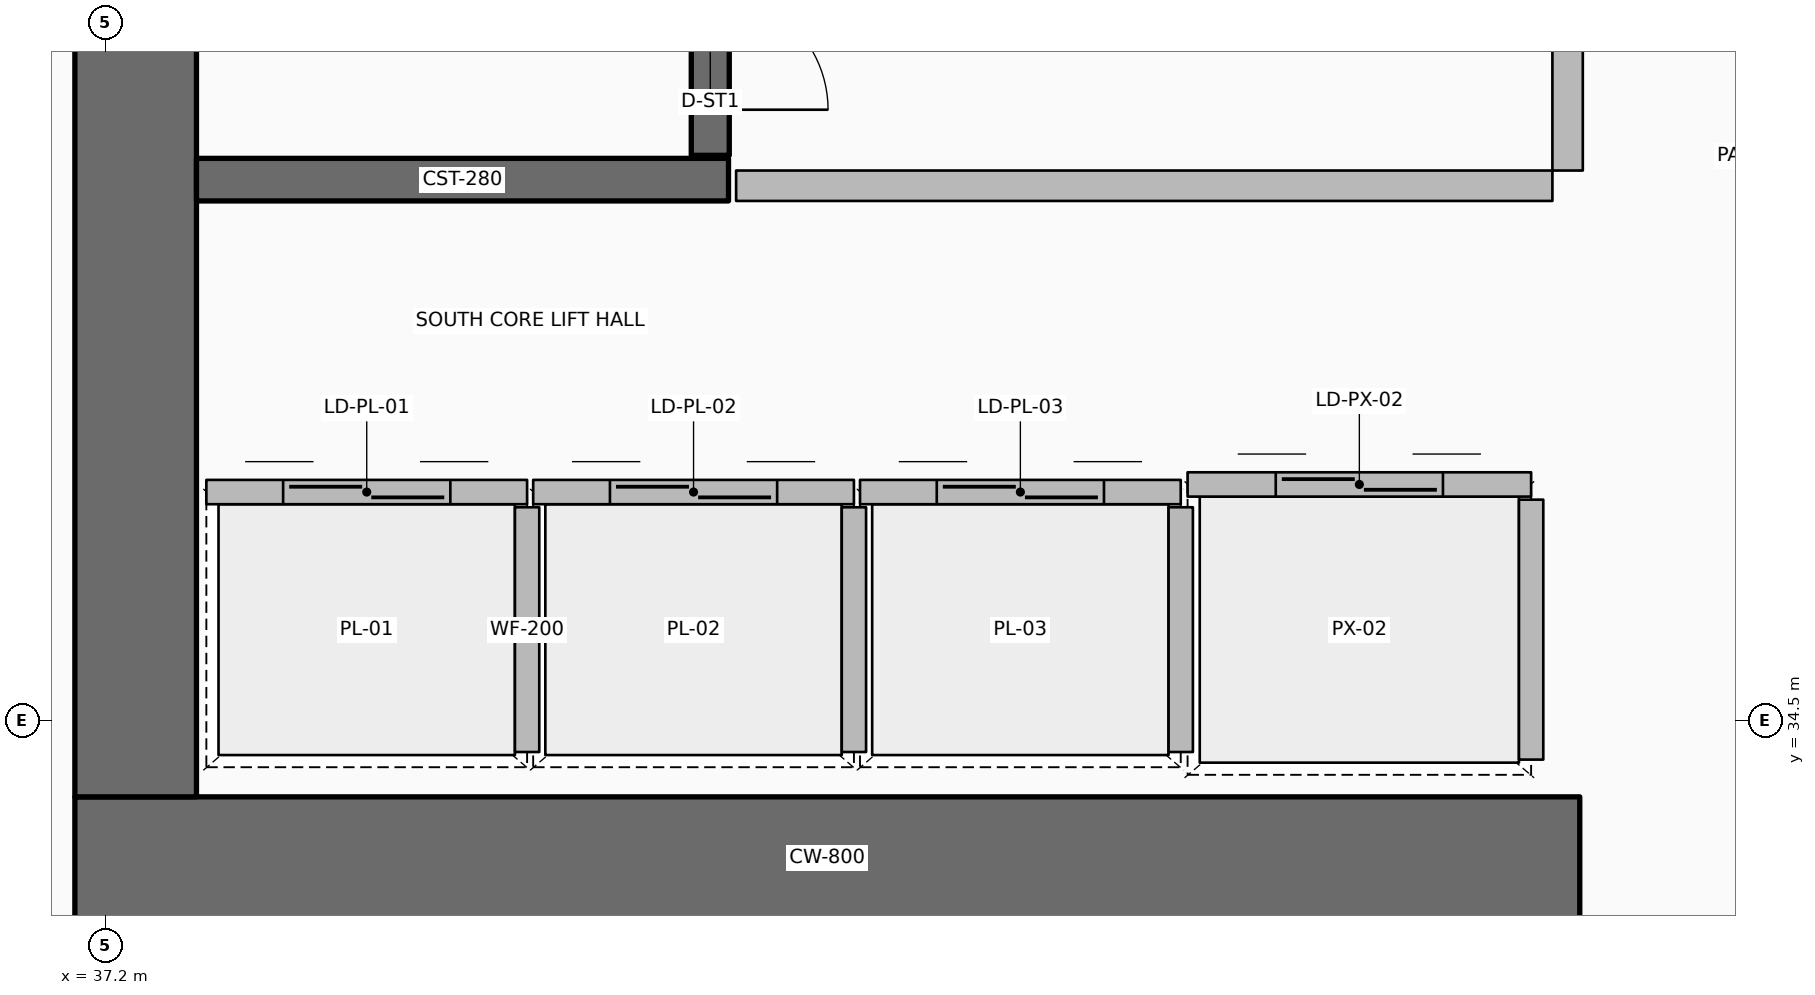
"""IFC4 building model, lengths in metres.
Left out: names, types, materials, properties, quantities, classifications, styles, units other than length and angle.
Written with IfcOpenShell. Run it as: python <this file> out.ifc"""

import sys

from ifc_helpers import new_model, si_unit, direction, frame, frame_2d, origin, place, context, subcontext, project, spatial, rectangle, extrude, element, fill, save


model = new_model("IFC4")
c1 = context("Model", 3, precision=1e-05, world=origin(), true_north=direction((0.0, 1.0)))
c2 = subcontext(c1, "Body", "Model", "MODEL_VIEW")
j1 = project(units=[si_unit("LENGTHUNIT", "METRE"), si_unit("PLANEANGLEUNIT", "RADIAN")], contexts=[c1])
p1 = place(None, origin())
s1 = spatial("IfcSite", under=j1, at=p1, CompositionType="ELEMENT")
p2 = place(p1, origin())
s2 = spatial("IfcBuilding", under=s1, at=p2, CompositionType="ELEMENT")
p3 = place(p2, frame((0.0, 0.0, 123.0)))
s3 = spatial("IfcBuildingStorey", under=s2, at=p3, CompositionType="ELEMENT", Elevation=123.0)
p4 = place(p3, frame((37.0, 33.6, 0.0), z_axis=(0.0, 0.0, 1.0), x_axis=(1.0, 0.0, 0.0)))
e1 = element("IfcWall", 1, at=p4, inside=s3, PredefinedType="SHEAR", context=c2, shape_type="SweptSolid", body=[
    extrude(rectangle(XDim=9.9, YDim=0.8, at=frame_2d((4.95, 0.0))), origin(), (0.0, 0.0, 1.0), 4.8),
])
p5 = place(p3, frame((37.4, 34.0, 0.0), z_axis=(0.0, 0.0, 1.0), x_axis=(0.0, 1.0, 0.0)))
e2 = element("IfcWall", 2, at=p5, inside=s3, PredefinedType="SHEAR", context=c2, shape_type="SweptSolid", body=[
    extrude(rectangle(XDim=16.0, YDim=0.8, at=frame_2d((8.0, 0.0))), origin(), (0.0, 0.0, 1.0), 4.8),
])
p6 = place(p3, frame((37.8, 38.06, 0.0), z_axis=(0.0, 0.0, 1.0), x_axis=(1.0, 0.0, 0.0)))
e3 = element("IfcWall", 3, at=p6, inside=s3, PredefinedType="SHEAR", context=c2, shape_type="SweptSolid", body=[
    extrude(rectangle(XDim=3.5, YDim=0.28, at=frame_2d((1.75, 0.0))), origin(), (0.0, 0.0, 1.0), 4.8),
])
p7 = place(p3, frame((41.18, 38.22, 0.0), z_axis=(0.0, 0.0, 1.0), x_axis=(0.0, 1.0, 0.0)))
e4 = element("IfcWall", 4, at=p7, inside=s3, PredefinedType="SOLIDWALL", context=c2, shape_type="SweptSolid", body=[
    extrude(rectangle(XDim=7.56, YDim=0.25, at=frame_2d((3.78, 0.0))), origin(), (0.0, 0.0, 1.0), 4.4),
])
p8 = place(p7, frame((0.3, 0.0, 0.0)))
e5 = element("IfcOpeningElement", 5, at=p8, cuts=e4, PredefinedType="OPENING", context=c2, shape_type="SweptSolid", body=[
    extrude(rectangle(XDim=1.55, YDim=2.15, at=frame_2d((0.775, 1.075))), frame((0.0, 0.135, 0.0), z_axis=(0.0, -1.0, 0.0), x_axis=(1.0, 0.0, 0.0)), (0.0, 0.0, 1.0), 0.27),
])
p9 = place(p3, frame((37.865, 36.005, 0.0), z_axis=(0.0, 0.0, 1.0), x_axis=(1.0, 0.0, 0.0)))
e6 = element("IfcWall", 6, at=p9, inside=s3, PredefinedType="PARTITIONING", context=c2, shape_type="SweptSolid", body=[
    extrude(rectangle(XDim=2.11, YDim=0.16, at=frame_2d((1.055, 0.0))), origin(), (0.0, 0.0, 1.0), 4.4),
])
p10 = place(p9, frame((0.505, 0.0, 0.0)))
e7 = element("IfcOpeningElement", 7, at=p10, cuts=e6, PredefinedType="OPENING", context=c2, shape_type="SweptSolid", body=[
    extrude(rectangle(XDim=1.1, YDim=2.1, at=frame_2d((0.55, 1.05))), frame((0.0, 0.09, 0.0), z_axis=(0.0, -1.0, 0.0), x_axis=(1.0, 0.0, 0.0)), (0.0, 0.0, 1.0), 0.18),
])
p11 = place(p3, frame((39.975, 34.295, 0.0), z_axis=(0.0, 0.0, 1.0), x_axis=(0.0, 1.0, 0.0)))
e8 = element("IfcWall", 8, at=p11, inside=s3, PredefinedType="PARTITIONING", context=c2, shape_type="SweptSolid", body=[
    extrude(rectangle(XDim=1.61, YDim=0.16, at=frame_2d((0.805, 0.0))), origin(), (0.0, 0.0, 1.0), 4.4),
])
p12 = place(p3, frame((40.015, 36.005, 0.0), z_axis=(0.0, 0.0, 1.0), x_axis=(1.0, 0.0, 0.0)))
e9 = element("IfcWall", 9, at=p12, inside=s3, PredefinedType="PARTITIONING", context=c2, shape_type="SweptSolid", body=[
    extrude(rectangle(XDim=2.11, YDim=0.16, at=frame_2d((1.055, 0.0))), origin(), (0.0, 0.0, 1.0), 4.4),
])
p13 = place(p12, frame((0.505, 0.0, 0.0)))
e10 = element("IfcOpeningElement", 10, at=p13, cuts=e9, PredefinedType="OPENING", context=c2, shape_type="SweptSolid", body=[
    extrude(rectangle(XDim=1.1, YDim=2.1, at=frame_2d((0.55, 1.05))), frame((0.0, 0.09, 0.0), z_axis=(0.0, -1.0, 0.0), x_axis=(1.0, 0.0, 0.0)), (0.0, 0.0, 1.0), 0.18),
])
p14 = place(p3, frame((42.125, 34.295, 0.0), z_axis=(0.0, 0.0, 1.0), x_axis=(0.0, 1.0, 0.0)))
e11 = element("IfcWall", 11, at=p14, inside=s3, PredefinedType="PARTITIONING", context=c2, shape_type="SweptSolid", body=[
    extrude(rectangle(XDim=1.61, YDim=0.16, at=frame_2d((0.805, 0.0))), origin(), (0.0, 0.0, 1.0), 4.4),
])
p15 = place(p3, frame((42.165, 36.005, 0.0), z_axis=(0.0, 0.0, 1.0), x_axis=(1.0, 0.0, 0.0)))
e12 = element("IfcWall", 12, at=p15, inside=s3, PredefinedType="PARTITIONING", context=c2, shape_type="SweptSolid", body=[
    extrude(rectangle(XDim=2.11, YDim=0.16, at=frame_2d((1.055, 0.0))), origin(), (0.0, 0.0, 1.0), 4.4),
])
p16 = place(p15, frame((0.505, 0.0, 0.0)))
e13 = element("IfcOpeningElement", 13, at=p16, cuts=e12, PredefinedType="OPENING", context=c2, shape_type="SweptSolid", body=[
    extrude(rectangle(XDim=1.1, YDim=2.1, at=frame_2d((0.55, 1.05))), frame((0.0, 0.09, 0.0), z_axis=(0.0, -1.0, 0.0), x_axis=(1.0, 0.0, 0.0)), (0.0, 0.0, 1.0), 0.18),
])
p17 = place(p3, frame((44.275, 34.295, 0.0), z_axis=(0.0, 0.0, 1.0), x_axis=(0.0, 1.0, 0.0)))
e14 = element("IfcWall", 14, at=p17, inside=s3, PredefinedType="PARTITIONING", context=c2, shape_type="SweptSolid", body=[
    extrude(rectangle(XDim=1.61, YDim=0.16, at=frame_2d((0.805, 0.0))), origin(), (0.0, 0.0, 1.0), 4.4),
])
p18 = place(p3, frame((44.32, 36.055, 0.0), z_axis=(0.0, 0.0, 1.0), x_axis=(1.0, 0.0, 0.0)))
e15 = element("IfcWall", 15, at=p18, inside=s3, PredefinedType="PARTITIONING", context=c2, shape_type="SweptSolid", body=[
    extrude(rectangle(XDim=2.26, YDim=0.16, at=frame_2d((1.13, 0.0))), origin(), (0.0, 0.0, 1.0), 4.4),
])
p19 = place(p18, frame((0.58, 0.0, 0.0)))
e16 = element("IfcOpeningElement", 16, at=p19, cuts=e15, PredefinedType="OPENING", context=c2, shape_type="SweptSolid", body=[
    extrude(rectangle(XDim=1.1, YDim=2.1, at=frame_2d((0.55, 1.05))), frame((0.0, 0.09, 0.0), z_axis=(0.0, -1.0, 0.0), x_axis=(1.0, 0.0, 0.0)), (0.0, 0.0, 1.0), 0.18),
])
p20 = place(p3, frame((46.58, 34.245, 0.0), z_axis=(0.0, 0.0, 1.0), x_axis=(0.0, 1.0, 0.0)))
e17 = element("IfcWall", 17, at=p20, inside=s3, PredefinedType="PARTITIONING", context=c2, shape_type="SweptSolid", body=[
    extrude(rectangle(XDim=1.71, YDim=0.16, at=frame_2d((0.855, 0.0))), origin(), (0.0, 0.0, 1.0), 4.4),
])
p21 = place(p3, frame((41.35, 38.02, 0.0), z_axis=(0.0, 0.0, 1.0), x_axis=(1.0, 0.0, 0.0)))
e18 = element("IfcWall", 18, at=p21, inside=s3, PredefinedType="PARTITIONING", context=c2, shape_type="SweptSolid", body=[
    extrude(rectangle(XDim=5.37, YDim=0.2, at=frame_2d((2.685, 0.0))), origin(), (0.0, 0.0, 1.0), 4.4),
])
p22 = place(p3, frame((46.82, 38.12, 0.0), z_axis=(0.0, 0.0, 1.0), x_axis=(0.0, 1.0, 0.0)))
e19 = element("IfcWall", 19, at=p22, inside=s3, PredefinedType="PARTITIONING", context=c2, shape_type="SweptSolid", body=[
    extrude(rectangle(XDim=3.26, YDim=0.2, at=frame_2d((1.63, 0.0))), origin(), (0.0, 0.0, 1.0), 4.4),
])
p23 = place(p22, frame((1.105, 0.0, 0.0)))
e20 = element("IfcOpeningElement", 20, at=p23, cuts=e19, PredefinedType="OPENING", context=c2, shape_type="SweptSolid", body=[
    extrude(rectangle(XDim=1.05, YDim=2.1, at=frame_2d((0.525, 1.05))), frame((0.0, 0.11, 0.0), z_axis=(0.0, -1.0, 0.0), x_axis=(1.0, 0.0, 0.0)), (0.0, 0.0, 1.0), 0.22),
])
p24 = place(p8, origin())
e21 = element("IfcDoor", 21, at=p24, inside=s3, OperationType="DOUBLE_DOOR_SINGLE_SWING", PredefinedType="DOOR", context=c2, shape_type="SweptSolid", body=[
    extrude(rectangle(XDim=1.55, YDim=2.15, at=frame_2d((0.775, 1.075))), frame((0.0, 0.025, 0.0), z_axis=(0.0, -1.0, 0.0), x_axis=(1.0, 0.0, 0.0)), (0.0, 0.0, 1.0), 0.05),
])
fill(e5, e21)
p25 = place(p10, origin())
e22 = element("IfcDoor", 22, at=p25, inside=s3, OperationType="DOUBLE_DOOR_SLIDING", PredefinedType="DOOR", context=c2, shape_type="SweptSolid", body=[
    extrude(rectangle(XDim=1.1, YDim=2.1, at=frame_2d((0.55, 1.05))), frame((0.0, 0.025, 0.0), z_axis=(0.0, -1.0, 0.0), x_axis=(1.0, 0.0, 0.0)), (0.0, 0.0, 1.0), 0.05),
])
fill(e7, e22)
p26 = place(p13, origin())
e23 = element("IfcDoor", 23, at=p26, inside=s3, OperationType="DOUBLE_DOOR_SLIDING", PredefinedType="DOOR", context=c2, shape_type="SweptSolid", body=[
    extrude(rectangle(XDim=1.1, YDim=2.1, at=frame_2d((0.55, 1.05))), frame((0.0, 0.025, 0.0), z_axis=(0.0, -1.0, 0.0), x_axis=(1.0, 0.0, 0.0)), (0.0, 0.0, 1.0), 0.05),
])
fill(e10, e23)
p27 = place(p16, origin())
e24 = element("IfcDoor", 24, at=p27, inside=s3, OperationType="DOUBLE_DOOR_SLIDING", PredefinedType="DOOR", context=c2, shape_type="SweptSolid", body=[
    extrude(rectangle(XDim=1.1, YDim=2.1, at=frame_2d((0.55, 1.05))), frame((0.0, 0.025, 0.0), z_axis=(0.0, -1.0, 0.0), x_axis=(1.0, 0.0, 0.0)), (0.0, 0.0, 1.0), 0.05),
])
fill(e13, e24)
p28 = place(p19, origin())
e25 = element("IfcDoor", 25, at=p28, inside=s3, OperationType="DOUBLE_DOOR_SLIDING", PredefinedType="DOOR", context=c2, shape_type="SweptSolid", body=[
    extrude(rectangle(XDim=1.1, YDim=2.1, at=frame_2d((0.55, 1.05))), frame((0.0, 0.025, 0.0), z_axis=(0.0, -1.0, 0.0), x_axis=(1.0, 0.0, 0.0)), (0.0, 0.0, 1.0), 0.05),
])
fill(e16, e25)
save(model, sys.argv[1])
